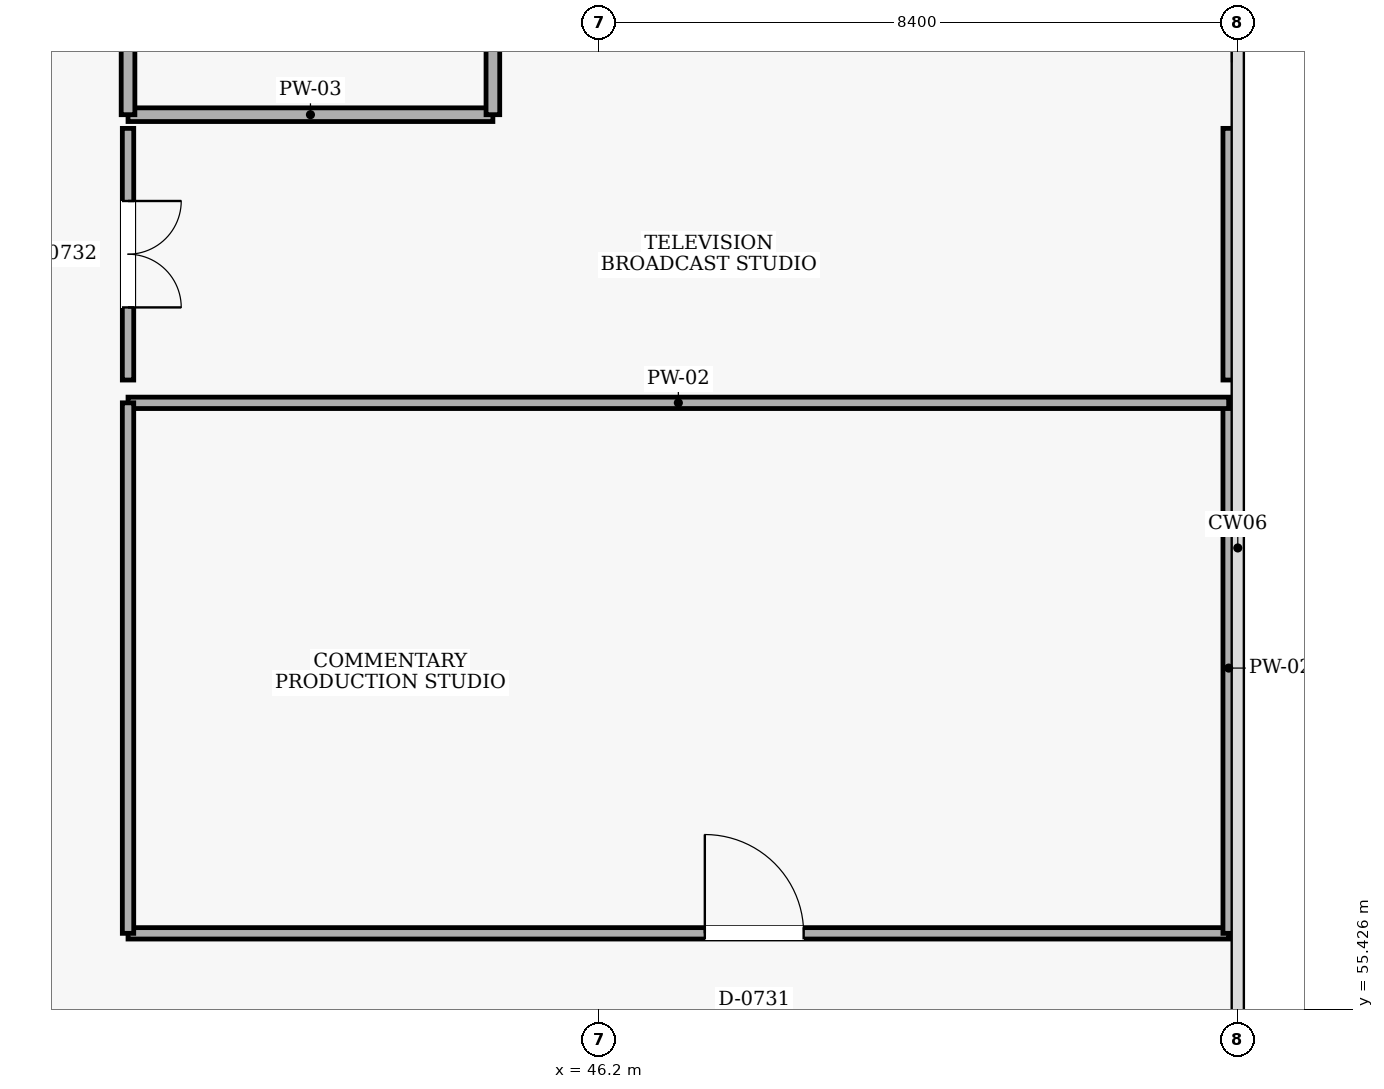
"""IFC4 building model, lengths in metres.
Left out: names, types, materials, properties, quantities, classifications, styles, units other than length and angle.
Written with IfcOpenShell. Run it as: python <this file> out.ifc"""

import sys

from ifc_helpers import new_model, si_unit, direction, frame, frame_2d, origin, place, context, subcontext, project, spatial, rectangle, extrude, element, fill, save


model = new_model("IFC4")
c1 = context("Model", 3, precision=1e-05, world=origin(), true_north=direction((0.0, 1.0)))
c2 = subcontext(c1, "Body", "Model", "MODEL_VIEW")
j1 = project(units=[si_unit("LENGTHUNIT", "METRE"), si_unit("PLANEANGLEUNIT", "RADIAN")], contexts=[c1])
p1 = place(None, origin())
s1 = spatial("IfcSite", under=j1, at=p1, CompositionType="ELEMENT")
p2 = place(p1, origin())
s2 = spatial("IfcBuilding", under=s1, at=p2, CompositionType="ELEMENT")
p3 = place(p2, frame((0.0, 0.0, 19.8)))
s3 = spatial("IfcBuildingStorey", under=s2, at=p3, CompositionType="ELEMENT", Elevation=19.8)
p4 = place(p3, frame((40.0, 67.2, 0.0), z_axis=(0.0, 0.0, 1.0), x_axis=(1.0, 0.0, 0.0)))
e1 = element("IfcWall", 1, at=p4, inside=s3, PredefinedType="PARTITIONING", context=c2, shape_type="SweptSolid", body=[
    extrude(rectangle(XDim=4.8, YDim=0.18, at=frame_2d((2.4, 0.0))), origin(), (0.0, 0.0, 1.0), 4.5),
])
p5 = place(p3, frame((44.8, 67.2, 0.0), z_axis=(0.0, 0.0, 1.0), x_axis=(0.0, 1.0, 0.0)))
e2 = element("IfcWall", 2, at=p5, inside=s3, PredefinedType="PARTITIONING", context=c2, shape_type="SweptSolid", body=[
    extrude(rectangle(XDim=3.2, YDim=0.18, at=frame_2d((1.6, 0.0))), origin(), (0.0, 0.0, 1.0), 4.5),
])
p6 = place(p3, frame((40.0, 70.4, 0.0), z_axis=(0.0, 0.0, 1.0), x_axis=(0.0, -1.0, 0.0)))
e3 = element("IfcWall", 3, at=p6, inside=s3, PredefinedType="PARTITIONING", context=c2, shape_type="SweptSolid", body=[
    extrude(rectangle(XDim=3.2, YDim=0.18, at=frame_2d((1.6, 0.0))), origin(), (0.0, 0.0, 1.0), 4.5),
])
p7 = place(p6, frame((1.1, 0.0, 0.0)))
e4 = element("IfcOpeningElement", 4, at=p7, cuts=e3, PredefinedType="OPENING", context=c2, shape_type="SweptSolid", body=[
    extrude(rectangle(XDim=1.0, YDim=2.1, at=frame_2d((0.5, 1.05))), frame((0.0, 0.1, 0.0), z_axis=(0.0, -1.0, 0.0), x_axis=(1.0, 0.0, 0.0)), (0.0, 0.0, 1.0), 0.2),
])
p8 = place(p3, frame((40.0, 56.43, 0.0), z_axis=(0.0, 0.0, 1.0), x_axis=(1.0, 0.0, 0.0)))
e5 = element("IfcWall", 5, at=p8, inside=s3, PredefinedType="PARTITIONING", context=c2, shape_type="SweptSolid", body=[
    extrude(rectangle(XDim=14.48, YDim=0.15, at=frame_2d((7.24, 0.0))), origin(), (0.0, 0.0, 1.0), 4.5),
])
p9 = place(p8, frame((7.588, 0.0, 0.0)))
e6 = element("IfcOpeningElement", 6, at=p9, cuts=e5, PredefinedType="OPENING", context=c2, shape_type="SweptSolid", body=[
    extrude(rectangle(XDim=1.3, YDim=2.2, at=frame_2d((0.65, 1.1))), frame((0.0, 0.085, 0.0), z_axis=(0.0, -1.0, 0.0), x_axis=(1.0, 0.0, 0.0)), (0.0, 0.0, 1.0), 0.17),
])
p10 = place(p3, frame((54.48, 56.43, 0.0), z_axis=(0.0, 0.0, 1.0), x_axis=(0.0, 1.0, 0.0)))
e7 = element("IfcWall", 7, at=p10, inside=s3, PredefinedType="PARTITIONING", context=c2, shape_type="SweptSolid", body=[
    extrude(rectangle(XDim=6.979, YDim=0.15, at=frame_2d((3.49, 0.0))), origin(), (0.0, 0.0, 1.0), 4.5),
])
p11 = place(p3, frame((54.48, 63.409, 0.0), z_axis=(0.0, 0.0, 1.0), x_axis=(-1.0, 0.0, 0.0)))
e8 = element("IfcWall", 8, at=p11, inside=s3, PredefinedType="PARTITIONING", context=c2, shape_type="SweptSolid", body=[
    extrude(rectangle(XDim=14.48, YDim=0.15, at=frame_2d((7.24, 0.0))), origin(), (0.0, 0.0, 1.0), 4.5),
])
p12 = place(p3, frame((40.0, 63.409, 0.0), z_axis=(0.0, 0.0, 1.0), x_axis=(0.0, -1.0, 0.0)))
e9 = element("IfcWall", 9, at=p12, inside=s3, PredefinedType="PARTITIONING", context=c2, shape_type="SweptSolid", body=[
    extrude(rectangle(XDim=6.979, YDim=0.15, at=frame_2d((3.49, 0.0))), origin(), (0.0, 0.0, 1.0), 4.5),
])
p13 = place(p3, frame((54.48, 63.709, 0.0), z_axis=(0.0, 0.0, 1.0), x_axis=(0.0, 1.0, 0.0)))
e10 = element("IfcWall", 10, at=p13, inside=s3, PredefinedType="PARTITIONING", context=c2, shape_type="SweptSolid", body=[
    extrude(rectangle(XDim=3.311, YDim=0.15, at=frame_2d((1.655, 0.0))), origin(), (0.0, 0.0, 1.0), 4.5),
])
p14 = place(p3, frame((40.0, 67.02, 0.0), z_axis=(0.0, 0.0, 1.0), x_axis=(0.0, -1.0, 0.0)))
e11 = element("IfcWall", 11, at=p14, inside=s3, PredefinedType="PARTITIONING", context=c2, shape_type="SweptSolid", body=[
    extrude(rectangle(XDim=3.311, YDim=0.15, at=frame_2d((1.655, 0.0))), origin(), (0.0, 0.0, 1.0), 4.5),
])
p15 = place(p14, frame((0.955, 0.0, 0.0)))
e12 = element("IfcOpeningElement", 12, at=p15, cuts=e11, PredefinedType="OPENING", context=c2, shape_type="SweptSolid", body=[
    extrude(rectangle(XDim=1.4, YDim=2.2, at=frame_2d((0.7, 1.1))), frame((0.0, 0.085, 0.0), z_axis=(0.0, -1.0, 0.0), x_axis=(1.0, 0.0, 0.0)), (0.0, 0.0, 1.0), 0.17),
])
p16 = place(p9, origin())
e13 = element("IfcDoor", 13, at=p16, inside=s3, OperationType="SINGLE_SWING_LEFT", PredefinedType="DOOR", context=c2, shape_type="SweptSolid", body=[
    extrude(rectangle(XDim=1.3, YDim=2.2, at=frame_2d((0.65, 1.1))), frame((0.0, 0.025, 0.0), z_axis=(0.0, -1.0, 0.0), x_axis=(1.0, 0.0, 0.0)), (0.0, 0.0, 1.0), 0.05),
])
fill(e6, e13)
p17 = place(p15, origin())
e14 = element("IfcDoor", 14, at=p17, inside=s3, OperationType="DOUBLE_DOOR_SINGLE_SWING", PredefinedType="DOOR", context=c2, shape_type="SweptSolid", body=[
    extrude(rectangle(XDim=1.4, YDim=2.2, at=frame_2d((0.7, 1.1))), frame((0.0, 0.025, 0.0), z_axis=(0.0, -1.0, 0.0), x_axis=(1.0, 0.0, 0.0)), (0.0, 0.0, 1.0), 0.05),
])
fill(e12, e14)
save(model, sys.argv[1])
